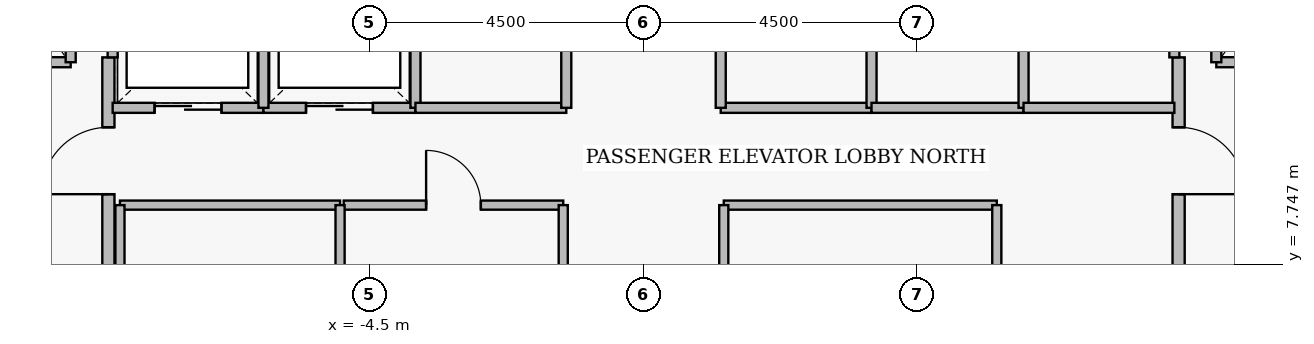
"""IFC4 building model, lengths in metres.
Left out: names, types, materials, properties, quantities, classifications, styles, units other than length and angle.
Written with IfcOpenShell. Run it as: python <this file> out.ifc"""

import sys

from ifc_helpers import new_model, si_unit, direction, frame, frame_2d, origin, place, context, subcontext, project, spatial, rectangle, extrude, element, fill, save


model = new_model("IFC4")
c1 = context("Model", 3, precision=1e-05, world=origin(), true_north=direction((0.0, 1.0)))
c2 = subcontext(c1, "Body", "Model", "MODEL_VIEW")
j1 = project(units=[si_unit("LENGTHUNIT", "METRE"), si_unit("PLANEANGLEUNIT", "RADIAN")], contexts=[c1])
p1 = place(None, origin())
s1 = spatial("IfcSite", under=j1, at=p1, CompositionType="ELEMENT")
p2 = place(p1, origin())
s2 = spatial("IfcBuilding", under=s1, at=p2, CompositionType="ELEMENT")
p3 = place(p2, frame((0.0, 0.0, -4.5)))
s3 = spatial("IfcBuildingStorey", under=s2, at=p3, CompositionType="ELEMENT", Elevation=-4.5)
p4 = place(p3, frame((-8.8, 5.05, 0.0), z_axis=(0.0, 0.0, 1.0), x_axis=(0.0, 1.0, 0.0)))
e1 = element("IfcWall", 1, at=p4, inside=s3, PredefinedType="PARTITIONING", context=c2, shape_type="SweptSolid", body=[
    extrude(rectangle(XDim=6.1, YDim=0.2, at=frame_2d((3.05, 0.0))), origin(), (0.0, 0.0, 1.0), 4.24),
])
p5 = place(p4, frame((0.25, 0.0, 0.0)))
e2 = element("IfcOpeningElement", 2, at=p5, cuts=e1, PredefinedType="OPENING", context=c2, shape_type="SweptSolid", body=[
    extrude(rectangle(XDim=1.1, YDim=2.2, at=frame_2d((0.55, 1.1))), frame((0.0, 0.11, 0.0), z_axis=(0.0, -1.0, 0.0), x_axis=(1.0, 0.0, 0.0)), (0.0, 0.0, 1.0), 0.22),
])
p6 = place(p4, frame((3.85, 0.0, 0.0)))
e3 = element("IfcOpeningElement", 3, at=p6, cuts=e1, PredefinedType="OPENING", context=c2, shape_type="SweptSolid", body=[
    extrude(rectangle(XDim=1.1, YDim=2.2, at=frame_2d((0.55, 1.1))), frame((0.0, 0.11, 0.0), z_axis=(0.0, -1.0, 0.0), x_axis=(1.0, 0.0, 0.0)), (0.0, 0.0, 1.0), 0.22),
])
p7 = place(p3, frame((8.8, 11.15, 0.0), z_axis=(0.0, 0.0, 1.0), x_axis=(0.0, -1.0, 0.0)))
e4 = element("IfcWall", 4, at=p7, inside=s3, PredefinedType="PARTITIONING", context=c2, shape_type="SweptSolid", body=[
    extrude(rectangle(XDim=6.1, YDim=0.2, at=frame_2d((3.05, 0.0))), origin(), (0.0, 0.0, 1.0), 4.24),
])
p8 = place(p7, frame((1.15, 0.0, 0.0)))
e5 = element("IfcOpeningElement", 5, at=p8, cuts=e4, PredefinedType="OPENING", context=c2, shape_type="SweptSolid", body=[
    extrude(rectangle(XDim=1.1, YDim=2.2, at=frame_2d((0.55, 1.1))), frame((0.0, 0.11, 0.0), z_axis=(0.0, -1.0, 0.0), x_axis=(1.0, 0.0, 0.0)), (0.0, 0.0, 1.0), 0.22),
])
p9 = place(p7, frame((4.75, 0.0, 0.0)))
e6 = element("IfcOpeningElement", 6, at=p9, cuts=e4, PredefinedType="OPENING", context=c2, shape_type="SweptSolid", body=[
    extrude(rectangle(XDim=1.1, YDim=2.2, at=frame_2d((0.55, 1.1))), frame((0.0, 0.11, 0.0), z_axis=(0.0, -1.0, 0.0), x_axis=(1.0, 0.0, 0.0)), (0.0, 0.0, 1.0), 0.22),
])
p10 = place(p3, frame((-11.58, 11.07, 0.0), z_axis=(0.0, 0.0, 1.0), x_axis=(1.0, 0.0, 0.0)))
e7 = element("IfcWall", 7, at=p10, inside=s3, PredefinedType="PARTITIONING", context=c2, shape_type="SweptSolid", body=[
    extrude(rectangle(XDim=2.16, YDim=0.165, at=frame_2d((1.08, 0.0))), origin(), (0.0, 0.0, 1.0), 4.24),
])
p11 = place(p10, frame((0.53, 0.0, 0.0)))
e8 = element("IfcOpeningElement", 8, at=p11, cuts=e7, PredefinedType="OPENING", context=c2, shape_type="SweptSolid", body=[
    extrude(rectangle(XDim=1.15, YDim=2.25, at=frame_2d((0.575, 1.125))), frame((0.0, 0.093, 0.0), z_axis=(0.0, -1.0, 0.0), x_axis=(1.0, 0.0, 0.0)), (0.0, 0.0, 1.0), 0.185),
])
p12 = place(p3, frame((9.42, 11.07, 0.0), z_axis=(0.0, 0.0, 1.0), x_axis=(1.0, 0.0, 0.0)))
e9 = element("IfcWall", 9, at=p12, inside=s3, PredefinedType="PARTITIONING", context=c2, shape_type="SweptSolid", body=[
    extrude(rectangle(XDim=2.16, YDim=0.165, at=frame_2d((1.08, 0.0))), origin(), (0.0, 0.0, 1.0), 4.24),
])
p13 = place(p12, frame((0.53, 0.0, 0.0)))
e10 = element("IfcOpeningElement", 10, at=p13, cuts=e9, PredefinedType="OPENING", context=c2, shape_type="SweptSolid", body=[
    extrude(rectangle(XDim=1.15, YDim=2.25, at=frame_2d((0.575, 1.125))), frame((0.0, 0.093, 0.0), z_axis=(0.0, -1.0, 0.0), x_axis=(1.0, 0.0, 0.0)), (0.0, 0.0, 1.0), 0.185),
])
p14 = place(p3, frame((-8.73, 10.32, 0.0), z_axis=(0.0, 0.0, 1.0), x_axis=(1.0, 0.0, 0.0)))
e11 = element("IfcWall", 11, at=p14, inside=s3, PredefinedType="PARTITIONING", context=c2, shape_type="SweptSolid", body=[
    extrude(rectangle(XDim=2.48, YDim=0.165, at=frame_2d((1.24, 0.0))), origin(), (0.0, 0.0, 1.0), 4.24),
])
p15 = place(p14, frame((0.69, 0.0, 0.0)))
e12 = element("IfcOpeningElement", 12, at=p15, cuts=e11, PredefinedType="OPENING", context=c2, shape_type="SweptSolid", body=[
    extrude(rectangle(XDim=1.1, YDim=2.25, at=frame_2d((0.55, 1.125))), frame((0.0, 0.093, 0.0), z_axis=(0.0, -1.0, 0.0), x_axis=(1.0, 0.0, 0.0)), (0.0, 0.0, 1.0), 0.185),
])
p16 = place(p3, frame((-6.25, 10.32, 0.0), z_axis=(0.0, 0.0, 1.0), x_axis=(1.0, 0.0, 0.0)))
e13 = element("IfcWall", 13, at=p16, inside=s3, PredefinedType="PARTITIONING", context=c2, shape_type="SweptSolid", body=[
    extrude(rectangle(XDim=2.5, YDim=0.165, at=frame_2d((1.25, 0.0))), origin(), (0.0, 0.0, 1.0), 4.24),
])
p17 = place(p16, frame((0.7, 0.0, 0.0)))
e14 = element("IfcOpeningElement", 14, at=p17, cuts=e13, PredefinedType="OPENING", context=c2, shape_type="SweptSolid", body=[
    extrude(rectangle(XDim=1.1, YDim=2.25, at=frame_2d((0.55, 1.125))), frame((0.0, 0.093, 0.0), z_axis=(0.0, -1.0, 0.0), x_axis=(1.0, 0.0, 0.0)), (0.0, 0.0, 1.0), 0.185),
])
p18 = place(p3, frame((-4.93, 8.72, 0.0), z_axis=(0.0, 0.0, 1.0), x_axis=(1.0, 0.0, 0.0)))
e15 = element("IfcWall", 15, at=p18, inside=s3, PredefinedType="PARTITIONING", context=c2, shape_type="SweptSolid", body=[
    extrude(rectangle(XDim=3.61, YDim=0.15, at=frame_2d((1.805, 0.0))), origin(), (0.0, 0.0, 1.0), 4.24),
])
p19 = place(p18, frame((1.355, 0.0, 0.0)))
e16 = element("IfcOpeningElement", 16, at=p19, cuts=e15, PredefinedType="OPENING", context=c2, shape_type="SweptSolid", body=[
    extrude(rectangle(XDim=0.9, YDim=2.15, at=frame_2d((0.45, 1.075))), frame((0.0, 0.085, 0.0), z_axis=(0.0, -1.0, 0.0), x_axis=(1.0, 0.0, 0.0)), (0.0, 0.0, 1.0), 0.17),
])
for number, where, z_axis, x_axis in (
    (17, (-9.42, 11.07, 0.0), (0.0, 0.0, 1.0), (0.0, 1.0, 0.0)),
    (18, (9.42, 11.07, 0.0), (0.0, 0.0, 1.0), (0.0, 1.0, 0.0)),
):
    element("IfcWall", number, at=place(p3, frame(where, z_axis=z_axis, x_axis=x_axis)), inside=s3, PredefinedType="PARTITIONING", context=c2, shape_type="SweptSolid", body=[
        extrude(rectangle(XDim=2.96, YDim=0.165, at=frame_2d((1.48, 0.0))), origin(), (0.0, 0.0, 1.0), 4.24),
    ])
p20 = place(p3, frame((-8.73, 11.15, 0.0), z_axis=(0.0, 0.0, 1.0), x_axis=(0.0, 1.0, 0.0)))
e19 = element("IfcWall", 19, at=p20, inside=s3, PredefinedType="PARTITIONING", context=c2, shape_type="SweptSolid", body=[
    extrude(rectangle(XDim=1.53, YDim=0.165, at=frame_2d((0.765, 0.0))), origin(), (0.0, 0.0, 1.0), 4.24),
])
for number, where, z_axis, x_axis in (
    (20, (-6.25, 10.32, 0.0), (0.0, 0.0, 1.0), (0.0, 1.0, 0.0)),
    (21, (-3.75, 10.32, 0.0), (0.0, 0.0, 1.0), (0.0, 1.0, 0.0)),
):
    element("IfcWall", number, at=place(p3, frame(where, z_axis=z_axis, x_axis=x_axis)), inside=s3, PredefinedType="PARTITIONING", context=c2, shape_type="SweptSolid", body=[
        extrude(rectangle(XDim=2.36, YDim=0.165, at=frame_2d((1.18, 0.0))), origin(), (0.0, 0.0, 1.0), 4.24),
    ])
p21 = place(p3, frame((-3.75, 10.32, 0.0), z_axis=(0.0, 0.0, 1.0), x_axis=(1.0, 0.0, 0.0)))
e22 = element("IfcWall", 22, at=p21, inside=s3, PredefinedType="PARTITIONING", context=c2, shape_type="SweptSolid", body=[
    extrude(rectangle(XDim=2.48, YDim=0.165, at=frame_2d((1.24, 0.0))), origin(), (0.0, 0.0, 1.0), 4.24),
])
p22 = place(p3, frame((-1.27, 10.32, 0.0), z_axis=(0.0, 0.0, 1.0), x_axis=(0.0, 1.0, 0.0)))
e23 = element("IfcWall", 23, at=p22, inside=s3, PredefinedType="PARTITIONING", context=c2, shape_type="SweptSolid", body=[
    extrude(rectangle(XDim=2.36, YDim=0.165, at=frame_2d((1.18, 0.0))), origin(), (0.0, 0.0, 1.0), 4.24),
])
p23 = place(p3, frame((1.27, 10.32, 0.0), z_axis=(0.0, 0.0, 1.0), x_axis=(1.0, 0.0, 0.0)))
e24 = element("IfcWall", 24, at=p23, inside=s3, PredefinedType="PARTITIONING", context=c2, shape_type="SweptSolid", body=[
    extrude(rectangle(XDim=2.48, YDim=0.165, at=frame_2d((1.24, 0.0))), origin(), (0.0, 0.0, 1.0), 4.24),
])
for number, where, z_axis, x_axis in (
    (25, (1.27, 10.32, 0.0), (0.0, 0.0, 1.0), (0.0, 1.0, 0.0)),
    (26, (3.75, 10.32, 0.0), (0.0, 0.0, 1.0), (0.0, 1.0, 0.0)),
):
    element("IfcWall", number, at=place(p3, frame(where, z_axis=z_axis, x_axis=x_axis)), inside=s3, PredefinedType="PARTITIONING", context=c2, shape_type="SweptSolid", body=[
        extrude(rectangle(XDim=2.36, YDim=0.165, at=frame_2d((1.18, 0.0))), origin(), (0.0, 0.0, 1.0), 4.24),
    ])
p24 = place(p3, frame((3.75, 10.32, 0.0), z_axis=(0.0, 0.0, 1.0), x_axis=(1.0, 0.0, 0.0)))
e27 = element("IfcWall", 27, at=p24, inside=s3, PredefinedType="PARTITIONING", context=c2, shape_type="SweptSolid", body=[
    extrude(rectangle(XDim=2.5, YDim=0.165, at=frame_2d((1.25, 0.0))), origin(), (0.0, 0.0, 1.0), 4.24),
])
p25 = place(p3, frame((6.25, 10.32, 0.0), z_axis=(0.0, 0.0, 1.0), x_axis=(0.0, 1.0, 0.0)))
e28 = element("IfcWall", 28, at=p25, inside=s3, PredefinedType="PARTITIONING", context=c2, shape_type="SweptSolid", body=[
    extrude(rectangle(XDim=2.36, YDim=0.165, at=frame_2d((1.18, 0.0))), origin(), (0.0, 0.0, 1.0), 4.24),
])
p26 = place(p3, frame((6.25, 10.32, 0.0), z_axis=(0.0, 0.0, 1.0), x_axis=(1.0, 0.0, 0.0)))
e29 = element("IfcWall", 29, at=p26, inside=s3, PredefinedType="PARTITIONING", context=c2, shape_type="SweptSolid", body=[
    extrude(rectangle(XDim=2.48, YDim=0.165, at=frame_2d((1.24, 0.0))), origin(), (0.0, 0.0, 1.0), 4.24),
])
p27 = place(p3, frame((8.73, 11.15, 0.0), z_axis=(0.0, 0.0, 1.0), x_axis=(0.0, 1.0, 0.0)))
e30 = element("IfcWall", 30, at=p27, inside=s3, PredefinedType="PARTITIONING", context=c2, shape_type="SweptSolid", body=[
    extrude(rectangle(XDim=1.53, YDim=0.165, at=frame_2d((0.765, 0.0))), origin(), (0.0, 0.0, 1.0), 4.24),
])
p28 = place(p3, frame((-8.61, 8.72, 0.0), z_axis=(0.0, 0.0, 1.0), x_axis=(1.0, 0.0, 0.0)))
e31 = element("IfcWall", 31, at=p28, inside=s3, PredefinedType="PARTITIONING", context=c2, shape_type="SweptSolid", body=[
    extrude(rectangle(XDim=3.62, YDim=0.15, at=frame_2d((1.81, 0.0))), origin(), (0.0, 0.0, 1.0), 4.24),
])
for number, where, z_axis, x_axis in (
    (32, (-8.61, 6.48, 0.0), (0.0, 0.0, 1.0), (0.0, 1.0, 0.0)),
    (33, (-4.99, 6.48, 0.0), (0.0, 0.0, 1.0), (0.0, 1.0, 0.0)),
    (34, (-1.32, 6.48, 0.0), (0.0, 0.0, 1.0), (0.0, 1.0, 0.0)),
):
    element("IfcWall", number, at=place(p3, frame(where, z_axis=z_axis, x_axis=x_axis)), inside=s3, PredefinedType="PARTITIONING", context=c2, shape_type="SweptSolid", body=[
        extrude(rectangle(XDim=2.24, YDim=0.15, at=frame_2d((1.12, 0.0))), origin(), (0.0, 0.0, 1.0), 4.24),
    ])
p29 = place(p3, frame((1.32, 8.72, 0.0), z_axis=(0.0, 0.0, 1.0), x_axis=(1.0, 0.0, 0.0)))
e35 = element("IfcWall", 35, at=p29, inside=s3, PredefinedType="PARTITIONING", context=c2, shape_type="SweptSolid", body=[
    extrude(rectangle(XDim=4.49, YDim=0.15, at=frame_2d((2.245, 0.0))), origin(), (0.0, 0.0, 1.0), 4.24),
])
for number, where, z_axis, x_axis in (
    (36, (1.32, 6.48, 0.0), (0.0, 0.0, 1.0), (0.0, 1.0, 0.0)),
    (37, (5.81, 6.48, 0.0), (0.0, 0.0, 1.0), (0.0, 1.0, 0.0)),
):
    element("IfcWall", number, at=place(p3, frame(where, z_axis=z_axis, x_axis=x_axis)), inside=s3, PredefinedType="PARTITIONING", context=c2, shape_type="SweptSolid", body=[
        extrude(rectangle(XDim=2.24, YDim=0.15, at=frame_2d((1.12, 0.0))), origin(), (0.0, 0.0, 1.0), 4.24),
    ])
p30 = place(p6, origin())
e38 = element("IfcDoor", 38, at=p30, inside=s3, OperationType="SINGLE_SWING_LEFT", PredefinedType="DOOR", context=c2, shape_type="SweptSolid", body=[
    extrude(rectangle(XDim=1.1, YDim=2.2, at=frame_2d((0.55, 1.1))), frame((0.0, 0.025, 0.0), z_axis=(0.0, -1.0, 0.0), x_axis=(1.0, 0.0, 0.0)), (0.0, 0.0, 1.0), 0.05),
])
fill(e3, e38)
p31 = place(p8, origin())
e39 = element("IfcDoor", 39, at=p31, inside=s3, OperationType="SINGLE_SWING_RIGHT", PredefinedType="DOOR", context=c2, shape_type="SweptSolid", body=[
    extrude(rectangle(XDim=1.1, YDim=2.2, at=frame_2d((0.55, 1.1))), frame((0.0, 0.025, 0.0), z_axis=(0.0, -1.0, 0.0), x_axis=(1.0, 0.0, 0.0)), (0.0, 0.0, 1.0), 0.05),
])
fill(e5, e39)
p32 = place(p15, origin())
e40 = element("IfcDoor", 40, at=p32, inside=s3, OperationType="SLIDING_TO_LEFT", PredefinedType="DOOR", context=c2, shape_type="SweptSolid", body=[
    extrude(rectangle(XDim=1.1, YDim=2.25, at=frame_2d((0.55, 1.125))), frame((0.0, 0.025, 0.0), z_axis=(0.0, -1.0, 0.0), x_axis=(1.0, 0.0, 0.0)), (0.0, 0.0, 1.0), 0.05),
])
fill(e12, e40)
p33 = place(p17, origin())
e41 = element("IfcDoor", 41, at=p33, inside=s3, OperationType="SLIDING_TO_LEFT", PredefinedType="DOOR", context=c2, shape_type="SweptSolid", body=[
    extrude(rectangle(XDim=1.1, YDim=2.25, at=frame_2d((0.55, 1.125))), frame((0.0, 0.025, 0.0), z_axis=(0.0, -1.0, 0.0), x_axis=(1.0, 0.0, 0.0)), (0.0, 0.0, 1.0), 0.05),
])
fill(e14, e41)
p34 = place(p19, origin())
e42 = element("IfcDoor", 42, at=p34, inside=s3, OperationType="SINGLE_SWING_LEFT", PredefinedType="DOOR", context=c2, shape_type="SweptSolid", body=[
    extrude(rectangle(XDim=0.9, YDim=2.15, at=frame_2d((0.45, 1.075))), frame((0.0, 0.025, 0.0), z_axis=(0.0, -1.0, 0.0), x_axis=(1.0, 0.0, 0.0)), (0.0, 0.0, 1.0), 0.05),
])
fill(e16, e42)
save(model, sys.argv[1])
